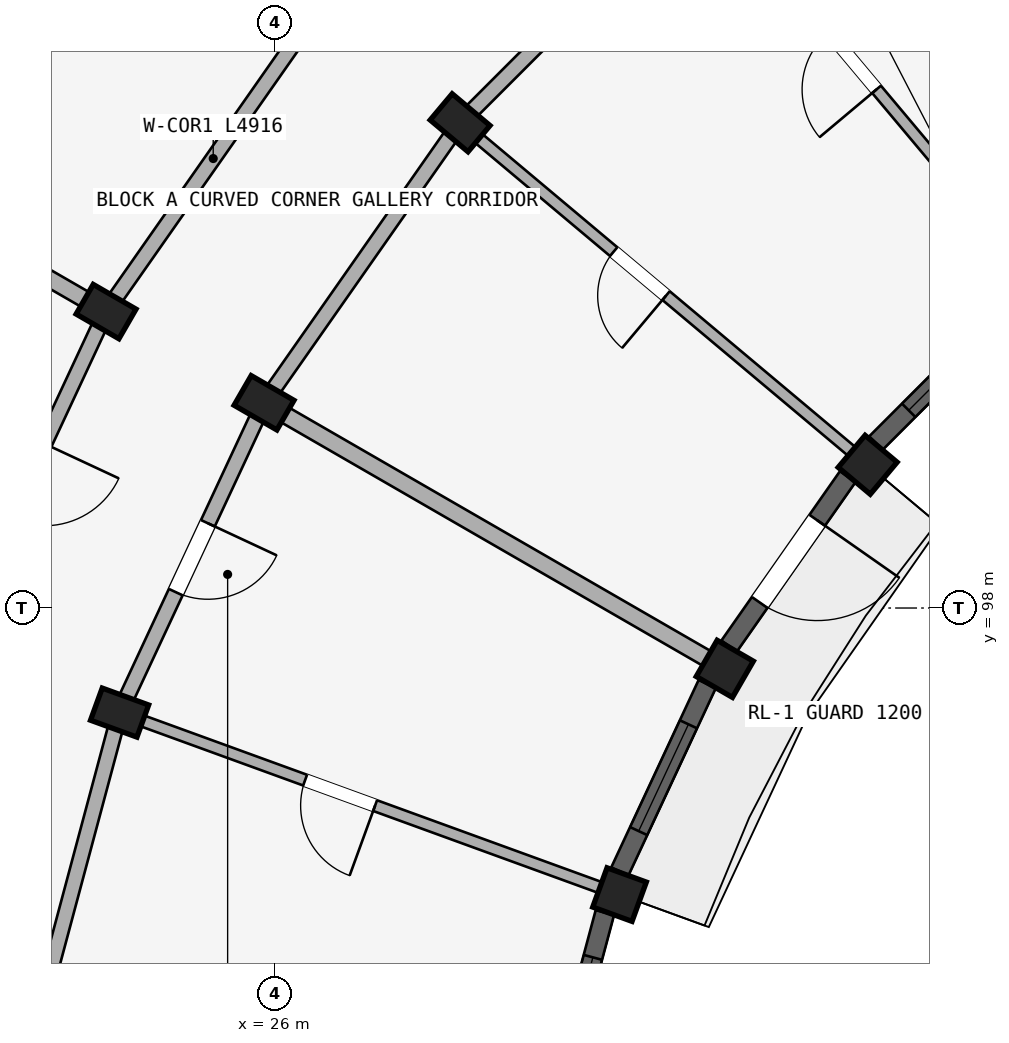
"""IFC4 building model, lengths in metres.
Left out: names, types, materials, properties, quantities, classifications, styles, units other than length and angle.
Written with IfcOpenShell. Run it as: python <this file> out.ifc"""

import sys

from ifc_helpers import new_model, si_unit, direction, frame, frame_2d, origin, origin_2d, place, context, subcontext, project, spatial, rectangle, extrude, element, fill, save


model = new_model("IFC4")
c1 = context("Model", 3, precision=1e-05, world=origin(), true_north=direction((0.0, 1.0)))
c2 = subcontext(c1, "Body", "Model", "MODEL_VIEW")
j1 = project(units=[si_unit("LENGTHUNIT", "METRE"), si_unit("PLANEANGLEUNIT", "RADIAN")], contexts=[c1])
p1 = place(None, origin())
s1 = spatial("IfcSite", under=j1, at=p1, CompositionType="ELEMENT")
p2 = place(p1, origin())
s2 = spatial("IfcBuilding", under=s1, at=p2, CompositionType="ELEMENT")
p3 = place(p2, frame((0.0, 0.0, 30.75)))
s3 = spatial("IfcBuildingStorey", under=s2, at=p3, CompositionType="ELEMENT", Elevation=30.75)
p4 = place(p3, frame((33.798, 99.885, 0.0), z_axis=(0.0, 0.0, 1.0), x_axis=(0.642787609687, 0.766044443119, 0.0)))
e1 = element("IfcColumn", 1, at=p4, inside=s3, PredefinedType="COLUMN", context=c2, shape_type="SweptSolid", body=[
    extrude(rectangle(XDim=0.55, YDim=0.55, at=origin_2d()), origin(), (0.0, 0.0, 1.0), 2.93),
])
p5 = place(p3, frame((28.436, 104.384, 0.0), z_axis=(0.0, 0.0, 1.0), x_axis=(0.642787609687, 0.766044443119, 0.0)))
e2 = element("IfcColumn", 2, at=p5, inside=s3, PredefinedType="COLUMN", context=c2, shape_type="SweptSolid", body=[
    extrude(rectangle(XDim=0.45, YDim=0.65, at=origin_2d()), origin(), (0.0, 0.0, 1.0), 2.93),
])
p6 = place(p3, frame((31.919, 97.2, 0.0), z_axis=(0.0, 0.0, 1.0), x_axis=(0.5, 0.866025403784, 0.0)))
e3 = element("IfcColumn", 3, at=p6, inside=s3, PredefinedType="COLUMN", context=c2, shape_type="SweptSolid", body=[
    extrude(rectangle(XDim=0.55, YDim=0.55, at=origin_2d()), origin(), (0.0, 0.0, 1.0), 2.93),
])
for number, where, z_axis, x_axis in (
    (4, (25.856, 100.7, 0.0), (0.0, 0.0, 1.0), (0.5, 0.866, 0.0)),
    (5, (23.778, 101.9, 0.0), (0.0, 0.0, 1.0), (0.5, 0.866, 0.0)),
):
    element("IfcColumn", number, at=place(p3, frame(where, z_axis=z_axis, x_axis=x_axis)), inside=s3, PredefinedType="COLUMN", context=c2, shape_type="SweptSolid", body=[
        extrude(rectangle(XDim=0.45, YDim=0.65, at=origin_2d()), origin(), (0.0, 0.0, 1.0), 2.93),
    ])
p7 = place(p3, frame((30.534, 94.23, 0.0), z_axis=(0.0, 0.0, 1.0), x_axis=(0.342020143326, 0.939692620786, 0.0)))
e6 = element("IfcColumn", 6, at=p7, inside=s3, PredefinedType="COLUMN", context=c2, shape_type="SweptSolid", body=[
    extrude(rectangle(XDim=0.55, YDim=0.55, at=origin_2d()), origin(), (0.0, 0.0, 1.0), 2.93),
])
p8 = place(p3, frame((23.956, 96.624, 0.0), z_axis=(0.0, 0.0, 1.0), x_axis=(0.342020143326, 0.939692620786, 0.0)))
e7 = element("IfcColumn", 7, at=p8, inside=s3, PredefinedType="COLUMN", context=c2, shape_type="SweptSolid", body=[
    extrude(rectangle(XDim=0.45, YDim=0.65, at=origin_2d()), origin(), (0.0, 0.0, 1.0), 2.93),
])
p9 = place(p3, frame((31.616, 107.564, 0.0), z_axis=(0.0, 0.0, 1.0), x_axis=(-0.707106781187, -0.707106781187, 0.0)))
e8 = element("IfcWall", 8, at=p9, inside=s3, PredefinedType="STANDARD", context=c2, shape_type="SweptSolid", body=[
    extrude(rectangle(XDim=4.497, YDim=0.2, at=frame_2d((2.249, 0.0))), origin(), (0.0, 0.0, 1.0), 2.372),
])
p10 = place(p3, frame((28.436, 104.384, 0.0), z_axis=(0.0, 0.0, 1.0), x_axis=(-0.573571637217, -0.819155404658, 0.0)))
e9 = element("IfcWall", 9, at=p10, inside=s3, PredefinedType="STANDARD", context=c2, shape_type="SweptSolid", body=[
    extrude(rectangle(XDim=4.497, YDim=0.2, at=frame_2d((2.249, 0.0))), origin(), (0.0, 0.0, 1.0), 2.372),
])
p11 = place(p3, frame((26.598, 105.927, 0.0), z_axis=(0.0, 0.0, 1.0), x_axis=(-0.573592335331, -0.819140911474, 0.0)))
e10 = element("IfcWall", 10, at=p11, inside=s3, PredefinedType="STANDARD", context=c2, shape_type="SweptSolid", body=[
    extrude(rectangle(XDim=4.916, YDim=0.2, at=frame_2d((2.458, 0.0))), origin(), (0.0, 0.0, 1.0), 2.372),
])
p12 = place(p3, frame((25.856, 100.7, 0.0), z_axis=(0.0, 0.0, 1.0), x_axis=(-0.422617978463, -0.906307919131, 0.0)))
e11 = element("IfcWall", 11, at=p12, inside=s3, PredefinedType="STANDARD", context=c2, shape_type="SweptSolid", body=[
    extrude(rectangle(XDim=4.497, YDim=0.2, at=frame_2d((2.249, 0.0))), origin(), (0.0, 0.0, 1.0), 2.372),
])
p13 = place(p12, frame((1.749, 0.0, 0.0)))
e12 = element("IfcOpeningElement", 12, at=p13, cuts=e11, PredefinedType="OPENING", context=c2, shape_type="SweptSolid", body=[
    extrude(rectangle(XDim=1.0, YDim=2.15, at=frame_2d((0.5, 1.075))), frame((0.0, 0.11, 0.0), z_axis=(0.0, -1.0, 0.0), x_axis=(1.0, 0.0, 0.0)), (0.0, 0.0, 1.0), 0.22),
])
p14 = place(p3, frame((23.778, 101.9, 0.0), z_axis=(0.0, 0.0, 1.0), x_axis=(-0.422629854778, -0.906302381024, 0.0)))
e13 = element("IfcWall", 13, at=p14, inside=s3, PredefinedType="STANDARD", context=c2, shape_type="SweptSolid", body=[
    extrude(rectangle(XDim=4.915, YDim=0.2, at=frame_2d((2.458, 0.0))), origin(), (0.0, 0.0, 1.0), 2.372),
])
p15 = place(p14, frame((1.918, 0.0, 0.0)))
e14 = element("IfcOpeningElement", 14, at=p15, cuts=e13, PredefinedType="OPENING", context=c2, shape_type="SweptSolid", body=[
    extrude(rectangle(XDim=1.08, YDim=2.15, at=frame_2d((0.54, 1.075))), frame((0.0, 0.11, 0.0), z_axis=(0.0, -1.0, 0.0), x_axis=(1.0, 0.0, 0.0)), (0.0, 0.0, 1.0), 0.22),
])
p16 = place(p3, frame((23.956, 96.624, 0.0), z_axis=(0.0, 0.0, 1.0), x_axis=(-0.258787642463, -0.965934240054, 0.0)))
e15 = element("IfcWall", 15, at=p16, inside=s3, PredefinedType="STANDARD", context=c2, shape_type="SweptSolid", body=[
    extrude(rectangle(XDim=4.497, YDim=0.2, at=frame_2d((2.249, 0.0))), origin(), (0.0, 0.0, 1.0), 2.372),
])
p17 = place(p3, frame((35.987, 102.355, 0.0), z_axis=(0.0, 0.0, 1.0), x_axis=(-0.642784846501, 0.766046761698, 0.0)))
e16 = element("IfcWall", 16, at=p17, inside=s3, PredefinedType="PARTITIONING", context=c2, shape_type="SweptSolid", body=[
    extrude(rectangle(XDim=6.75, YDim=0.15, at=frame_2d((3.375, 0.0))), origin(), (0.0, 0.0, 1.0), 2.372),
])
p18 = place(p17, frame((3.222, 0.0, 0.0)))
e17 = element("IfcOpeningElement", 17, at=p18, cuts=e16, PredefinedType="OPENING", context=c2, shape_type="SweptSolid", body=[
    extrude(rectangle(XDim=0.98, YDim=2.12, at=frame_2d((0.49, 1.06))), frame((0.0, 0.085, 0.0), z_axis=(0.0, -1.0, 0.0), x_axis=(1.0, 0.0, 0.0)), (0.0, 0.0, 1.0), 0.17),
])
p19 = place(p3, frame((33.645, 100.013, 0.0), z_axis=(0.0, 0.0, 1.0), x_axis=(-0.766046761698, 0.642784846501, 0.0)))
e18 = element("IfcWall", 18, at=p19, inside=s3, PredefinedType="PARTITIONING", context=c2, shape_type="SweptSolid", body=[
    extrude(rectangle(XDim=6.75, YDim=0.15, at=frame_2d((3.375, 0.0))), origin(), (0.0, 0.0, 1.0), 2.372),
])
p20 = place(p19, frame((3.262, 0.0, 0.0)))
e19 = element("IfcOpeningElement", 19, at=p20, cuts=e18, PredefinedType="OPENING", context=c2, shape_type="SweptSolid", body=[
    extrude(rectangle(XDim=0.9, YDim=2.1, at=frame_2d((0.45, 1.05))), frame((0.0, 0.085, 0.0), z_axis=(0.0, -1.0, 0.0), x_axis=(1.0, 0.0, 0.0)), (0.0, 0.0, 1.0), 0.17),
])
p21 = place(p3, frame((31.746, 97.3, 0.0), z_axis=(0.0, 0.0, 1.0), x_axis=(-0.866026575979, 0.499997969693, 0.0)))
e20 = element("IfcWall", 20, at=p21, inside=s3, PredefinedType="STANDARD", context=c2, shape_type="SweptSolid", body=[
    extrude(rectangle(XDim=6.75, YDim=0.22, at=frame_2d((3.375, 0.0))), origin(), (0.0, 0.0, 1.0), 2.372),
])
p22 = place(p3, frame((23.691, 101.95, 0.0), z_axis=(0.0, 0.0, 1.0), x_axis=(-0.866026648973, 0.499997843263, 0.0)))
e21 = element("IfcWall", 21, at=p22, inside=s3, PredefinedType="STANDARD", context=c2, shape_type="SweptSolid", body=[
    extrude(rectangle(XDim=17.42, YDim=0.22, at=frame_2d((8.71, 0.0))), origin(), (0.0, 0.0, 1.0), 2.372),
])
p23 = place(p3, frame((30.346, 94.298, 0.0), z_axis=(0.0, 0.0, 1.0), x_axis=(-0.939696231917, 0.342010221662, 0.0)))
e22 = element("IfcWall", 22, at=p23, inside=s3, PredefinedType="PARTITIONING", context=c2, shape_type="SweptSolid", body=[
    extrude(rectangle(XDim=6.75, YDim=0.15, at=frame_2d((3.375, 0.0))), origin(), (0.0, 0.0, 1.0), 2.372),
])
p24 = place(p23, frame((3.222, 0.0, 0.0)))
e23 = element("IfcOpeningElement", 23, at=p24, cuts=e22, PredefinedType="OPENING", context=c2, shape_type="SweptSolid", body=[
    extrude(rectangle(XDim=0.98, YDim=2.12, at=frame_2d((0.49, 1.06))), frame((0.0, 0.085, 0.0), z_axis=(0.0, -1.0, 0.0), x_axis=(1.0, 0.0, 0.0)), (0.0, 0.0, 1.0), 0.17),
])
p25 = place(p3, frame((35.83, 102.093, 0.0), z_axis=(0.0, 0.0, 1.0), x_axis=(-0.707106781187, -0.707106781187, 0.0)))
e24 = element("IfcWall", 24, at=p25, inside=s3, PredefinedType="STANDARD", context=c2, shape_type="SweptSolid", body=[
    extrude(rectangle(XDim=2.72, YDim=0.25, at=frame_2d((1.36, 0.0))), origin(), (0.0, 0.0, 1.0), 2.422),
])
p26 = place(p25, frame((0.61, 0.0, 0.572)))
e25 = element("IfcOpeningElement", 25, at=p26, cuts=e24, PredefinedType="OPENING", context=c2, shape_type="SweptSolid", body=[
    extrude(rectangle(XDim=1.5, YDim=1.65, at=frame_2d((0.75, 0.825))), frame((0.0, 0.135, 0.0), z_axis=(0.0, -1.0, 0.0), x_axis=(1.0, 0.0, 0.0)), (0.0, 0.0, 1.0), 0.27),
])
p27 = place(p3, frame((33.536, 99.728, 0.0), z_axis=(0.0, 0.0, 1.0), x_axis=(-0.573612950921, -0.819126475299, 0.0)))
e26 = element("IfcWall", 26, at=p27, inside=s3, PredefinedType="STANDARD", context=c2, shape_type="SweptSolid", body=[
    extrude(rectangle(XDim=2.72, YDim=0.25, at=frame_2d((1.36, 0.0))), origin(), (0.0, 0.0, 1.0), 2.422),
])
p28 = place(p27, frame((0.7, 0.0, 0.0)))
e27 = element("IfcOpeningElement", 27, at=p28, cuts=e26, PredefinedType="OPENING", context=c2, shape_type="SweptSolid", body=[
    extrude(rectangle(XDim=1.32, YDim=2.15, at=frame_2d((0.66, 1.075))), frame((0.0, 0.135, 0.0), z_axis=(0.0, -1.0, 0.0), x_axis=(1.0, 0.0, 0.0)), (0.0, 0.0, 1.0), 0.27),
])
p29 = place(p3, frame((31.688, 97.0, 0.0), z_axis=(0.0, 0.0, 1.0), x_axis=(-0.422629903269, -0.906302358412, 0.0)))
e28 = element("IfcWall", 28, at=p29, inside=s3, PredefinedType="STANDARD", context=c2, shape_type="SweptSolid", body=[
    extrude(rectangle(XDim=2.72, YDim=0.25, at=frame_2d((1.36, 0.0))), origin(), (0.0, 0.0, 1.0), 2.422),
])
p30 = place(p29, frame((0.585, 0.0, 0.622)))
e29 = element("IfcOpeningElement", 29, at=p30, cuts=e28, PredefinedType="OPENING", context=c2, shape_type="SweptSolid", body=[
    extrude(rectangle(XDim=1.55, YDim=1.6, at=frame_2d((0.775, 0.8))), frame((0.0, 0.135, 0.0), z_axis=(0.0, -1.0, 0.0), x_axis=(1.0, 0.0, 0.0)), (0.0, 0.0, 1.0), 0.27),
])
p31 = place(p3, frame((30.341, 93.993, 0.0), z_axis=(0.0, 0.0, 1.0), x_axis=(-0.258807879411, -0.965928818058, 0.0)))
e30 = element("IfcWall", 30, at=p31, inside=s3, PredefinedType="STANDARD", context=c2, shape_type="SweptSolid", body=[
    extrude(rectangle(XDim=2.72, YDim=0.25, at=frame_2d((1.36, 0.0))), origin(), (0.0, 0.0, 1.0), 2.422),
])
p32 = place(p31, frame((0.61, 0.0, 0.572)))
e31 = element("IfcOpeningElement", 31, at=p32, cuts=e30, PredefinedType="OPENING", context=c2, shape_type="SweptSolid", body=[
    extrude(rectangle(XDim=1.5, YDim=1.65, at=frame_2d((0.75, 0.825))), frame((0.0, 0.135, 0.0), z_axis=(0.0, -1.0, 0.0), x_axis=(1.0, 0.0, 0.0)), (0.0, 0.0, 1.0), 0.27),
])
p33 = place(p26, origin())
e32 = element("IfcWindow", 32, at=p33, inside=s3, PartitioningType="DOUBLE_PANEL_VERTICAL", PredefinedType="WINDOW", context=c2, shape_type="SweptSolid", body=[
    extrude(rectangle(XDim=1.5, YDim=1.65, at=frame_2d((0.75, 0.825))), frame((0.0, 0.03, 0.0), z_axis=(0.0, -1.0, 0.0), x_axis=(1.0, 0.0, 0.0)), (0.0, 0.0, 1.0), 0.06),
])
fill(e25, e32)
p34 = place(p30, origin())
e33 = element("IfcWindow", 33, at=p34, inside=s3, PartitioningType="DOUBLE_PANEL_VERTICAL", PredefinedType="WINDOW", context=c2, shape_type="SweptSolid", body=[
    extrude(rectangle(XDim=1.55, YDim=1.6, at=frame_2d((0.775, 0.8))), frame((0.0, 0.03, 0.0), z_axis=(0.0, -1.0, 0.0), x_axis=(1.0, 0.0, 0.0)), (0.0, 0.0, 1.0), 0.06),
])
fill(e29, e33)
p35 = place(p32, origin())
e34 = element("IfcWindow", 34, at=p35, inside=s3, PartitioningType="DOUBLE_PANEL_VERTICAL", PredefinedType="WINDOW", context=c2, shape_type="SweptSolid", body=[
    extrude(rectangle(XDim=1.5, YDim=1.65, at=frame_2d((0.75, 0.825))), frame((0.0, 0.03, 0.0), z_axis=(0.0, -1.0, 0.0), x_axis=(1.0, 0.0, 0.0)), (0.0, 0.0, 1.0), 0.06),
])
fill(e31, e34)
p36 = place(p18, origin())
e35 = element("IfcDoor", 35, at=p36, inside=s3, OperationType="SINGLE_SWING_LEFT", PredefinedType="DOOR", context=c2, shape_type="SweptSolid", body=[
    extrude(rectangle(XDim=0.98, YDim=2.12, at=frame_2d((0.49, 1.06))), frame((0.0, 0.025, 0.0), z_axis=(0.0, -1.0, 0.0), x_axis=(1.0, 0.0, 0.0)), (0.0, 0.0, 1.0), 0.05),
])
fill(e17, e35)
p37 = place(p20, origin())
e36 = element("IfcDoor", 36, at=p37, inside=s3, OperationType="SINGLE_SWING_LEFT", PredefinedType="DOOR", context=c2, shape_type="SweptSolid", body=[
    extrude(rectangle(XDim=0.9, YDim=2.1, at=frame_2d((0.45, 1.05))), frame((0.0, 0.025, 0.0), z_axis=(0.0, -1.0, 0.0), x_axis=(1.0, 0.0, 0.0)), (0.0, 0.0, 1.0), 0.05),
])
fill(e19, e36)
p38 = place(p24, origin())
e37 = element("IfcDoor", 37, at=p38, inside=s3, OperationType="SINGLE_SWING_LEFT", PredefinedType="DOOR", context=c2, shape_type="SweptSolid", body=[
    extrude(rectangle(XDim=0.98, YDim=2.12, at=frame_2d((0.49, 1.06))), frame((0.0, 0.025, 0.0), z_axis=(0.0, -1.0, 0.0), x_axis=(1.0, 0.0, 0.0)), (0.0, 0.0, 1.0), 0.05),
])
fill(e23, e37)
p39 = place(p13, frame((1.0, 0.0, 0.0), z_axis=(0.0, 0.0, 1.0), x_axis=(-1.0, 0.0, 0.0)))
e38 = element("IfcDoor", 38, at=p39, inside=s3, OperationType="SINGLE_SWING_RIGHT", PredefinedType="DOOR", context=c2, shape_type="SweptSolid", body=[
    extrude(rectangle(XDim=1.0, YDim=2.15, at=frame_2d((0.5, 1.075))), frame((0.0, 0.025, 0.0), z_axis=(0.0, -1.0, 0.0), x_axis=(1.0, 0.0, 0.0)), (0.0, 0.0, 1.0), 0.05),
])
fill(e12, e38)
p40 = place(p28, origin())
e39 = element("IfcDoor", 39, at=p40, inside=s3, OperationType="SINGLE_SWING_LEFT", PredefinedType="DOOR", context=c2, shape_type="SweptSolid", body=[
    extrude(rectangle(XDim=1.32, YDim=2.15, at=frame_2d((0.66, 1.075))), frame((0.0, 0.025, 0.0), z_axis=(0.0, -1.0, 0.0), x_axis=(1.0, 0.0, 0.0)), (0.0, 0.0, 1.0), 0.05),
])
fill(e27, e39)
save(model, sys.argv[1])
